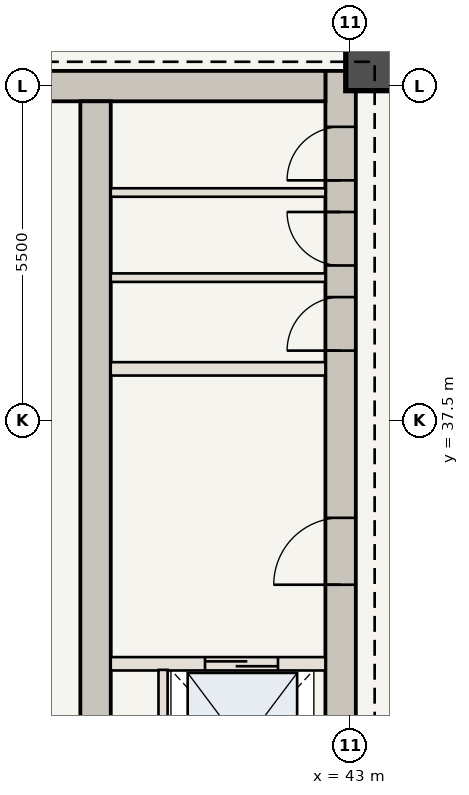
"""IFC4 building model, lengths in metres.
Left out: names, types, materials, properties, quantities, classifications, styles, units other than length and angle.
Written with IfcOpenShell. Run it as: python <this file> out.ifc"""

import sys

from ifc_helpers import new_model, si_unit, direction, frame, frame_2d, origin, origin_2d, place, context, subcontext, project, spatial, rectangle, extrude, element, fill, save


model = new_model("IFC4")
c1 = context("Model", 3, precision=1e-05, world=origin(), true_north=direction((0.0, 1.0)))
c2 = subcontext(c1, "Body", "Model", "MODEL_VIEW")
j1 = project(units=[si_unit("LENGTHUNIT", "METRE"), si_unit("PLANEANGLEUNIT", "RADIAN")], contexts=[c1])
p1 = place(None, origin())
s1 = spatial("IfcSite", under=j1, at=p1, CompositionType="ELEMENT")
p2 = place(p1, origin())
s2 = spatial("IfcBuilding", under=s1, at=p2, CompositionType="ELEMENT")
p3 = place(p2, frame((0.0, 0.0, 229.25)))
s3 = spatial("IfcBuildingStorey", under=s2, at=p3, CompositionType="ELEMENT", Elevation=229.25)
p4 = place(p3, frame((42.84, 30.6, 0.0), z_axis=(0.0, 0.0, 1.0), x_axis=(0.0, 1.0, 0.0)))
e1 = element("IfcWall", 1, at=p4, inside=s3, PredefinedType="SHEAR", context=c2, shape_type="SweptSolid", body=[
    extrude(rectangle(XDim=12.65, YDim=0.5, at=frame_2d((6.325, 0.0))), origin(), (0.0, 0.0, 1.0), 3.85),
])
p5 = place(p4, frame((4.2, 0.0, 0.0)))
e2 = element("IfcOpeningElement", 2, at=p5, cuts=e1, PredefinedType="OPENING", context=c2, shape_type="SweptSolid", body=[
    extrude(rectangle(XDim=1.1, YDim=2.15, at=frame_2d((0.55, 1.075))), frame((0.0, 0.26, 0.0), z_axis=(0.0, -1.0, 0.0), x_axis=(1.0, 0.0, 0.0)), (0.0, 0.0, 1.0), 0.52),
])
p6 = place(p4, frame((8.05, 0.0, 0.0)))
e3 = element("IfcOpeningElement", 3, at=p6, cuts=e1, PredefinedType="OPENING", context=c2, shape_type="SweptSolid", body=[
    extrude(rectangle(XDim=0.88, YDim=2.1, at=frame_2d((0.44, 1.05))), frame((0.0, 0.26, 0.0), z_axis=(0.0, -1.0, 0.0), x_axis=(1.0, 0.0, 0.0)), (0.0, 0.0, 1.0), 0.52),
])
p7 = place(p4, frame((9.45, 0.0, 0.0)))
e4 = element("IfcOpeningElement", 4, at=p7, cuts=e1, PredefinedType="OPENING", context=c2, shape_type="SweptSolid", body=[
    extrude(rectangle(XDim=0.88, YDim=2.1, at=frame_2d((0.44, 1.05))), frame((0.0, 0.26, 0.0), z_axis=(0.0, -1.0, 0.0), x_axis=(1.0, 0.0, 0.0)), (0.0, 0.0, 1.0), 0.52),
])
p8 = place(p4, frame((10.85, 0.0, 0.0)))
e5 = element("IfcOpeningElement", 5, at=p8, cuts=e1, PredefinedType="OPENING", context=c2, shape_type="SweptSolid", body=[
    extrude(rectangle(XDim=0.88, YDim=2.1, at=frame_2d((0.44, 1.05))), frame((0.0, 0.26, 0.0), z_axis=(0.0, -1.0, 0.0), x_axis=(1.0, 0.0, 0.0)), (0.0, 0.0, 1.0), 0.52),
])
p9 = place(p3, frame((37.75, 43.0, 0.0), z_axis=(0.0, 0.0, 1.0), x_axis=(1.0, 0.0, 0.0)))
e6 = element("IfcWall", 6, at=p9, inside=s3, PredefinedType="SHEAR", context=c2, shape_type="SweptSolid", body=[
    extrude(rectangle(XDim=4.84, YDim=0.5, at=frame_2d((2.42, 0.0))), origin(), (0.0, 0.0, 1.0), 3.85),
])
p10 = place(p3, frame((38.81, 30.6, 0.0), z_axis=(0.0, 0.0, 1.0), x_axis=(0.0, 1.0, 0.0)))
e7 = element("IfcWall", 7, at=p10, inside=s3, PredefinedType="SHEAR", context=c2, shape_type="SweptSolid", body=[
    extrude(rectangle(XDim=12.15, YDim=0.5, at=frame_2d((6.075, 0.0))), origin(), (0.0, 0.0, 1.0), 3.85),
])
p11 = place(p3, frame((43.35, 43.35, 0.0), z_axis=(0.0, 0.0, 1.0), x_axis=(1.0, 0.0, 0.0)))
e8 = element("IfcColumn", 8, at=p11, inside=s3, PredefinedType="COLUMN", context=c2, shape_type="SweptSolid", body=[
    extrude(rectangle(XDim=0.85, YDim=0.85, at=origin_2d()), origin(), (0.0, 0.0, 1.0), 3.85),
])
p12 = place(p3, frame((39.06, 33.5, 0.0), z_axis=(0.0, 0.0, 1.0), x_axis=(1.0, 0.0, 0.0)))
e9 = element("IfcWall", 9, at=p12, inside=s3, PredefinedType="STANDARD", context=c2, shape_type="SweptSolid", body=[
    extrude(rectangle(XDim=3.53, YDim=0.22, at=frame_2d((1.765, 0.0))), origin(), (0.0, 0.0, 1.0), 3.685),
])
p13 = place(p12, frame((1.55, 0.0, 0.0)))
e10 = element("IfcOpeningElement", 10, at=p13, cuts=e9, PredefinedType="OPENING", context=c2, shape_type="SweptSolid", body=[
    extrude(rectangle(XDim=1.2, YDim=2.2, at=frame_2d((0.6, 1.1))), frame((0.0, 0.12, 0.0), z_axis=(0.0, -1.0, 0.0), x_axis=(1.0, 0.0, 0.0)), (0.0, 0.0, 1.0), 0.24),
])
p14 = place(p3, frame((39.92, 30.75, 0.0), z_axis=(0.0, 0.0, 1.0), x_axis=(0.0, 1.0, 0.0)))
e11 = element("IfcWall", 11, at=p14, inside=s3, PredefinedType="STANDARD", context=c2, shape_type="SweptSolid", body=[
    extrude(rectangle(XDim=2.65, YDim=0.15, at=frame_2d((1.325, 0.0))), origin(), (0.0, 0.0, 1.0), 3.685),
])
p15 = place(p3, frame((39.06, 38.35, 0.0), z_axis=(0.0, 0.0, 1.0), x_axis=(1.0, 0.0, 0.0)))
e12 = element("IfcWall", 12, at=p15, inside=s3, PredefinedType="STANDARD", context=c2, shape_type="SweptSolid", body=[
    extrude(rectangle(XDim=3.53, YDim=0.22, at=frame_2d((1.765, 0.0))), origin(), (0.0, 0.0, 1.0), 3.685),
])
for number, where, z_axis, x_axis in (
    (13, (39.06, 39.85, 0.0), (0.0, 0.0, 1.0), (1.0, 0.0, 0.0)),
    (14, (39.06, 41.25, 0.0), (0.0, 0.0, 1.0), (1.0, 0.0, 0.0)),
):
    element("IfcWall", number, at=place(p3, frame(where, z_axis=z_axis, x_axis=x_axis)), inside=s3, PredefinedType="STANDARD", context=c2, shape_type="SweptSolid", body=[
        extrude(rectangle(XDim=3.53, YDim=0.14, at=frame_2d((1.765, 0.0))), origin(), (0.0, 0.0, 1.0), 3.685),
    ])
p16 = place(p5, origin())
e15 = element("IfcDoor", 15, at=p16, inside=s3, OperationType="SINGLE_SWING_LEFT", PredefinedType="DOOR", context=c2, shape_type="SweptSolid", body=[
    extrude(rectangle(XDim=1.1, YDim=2.15, at=frame_2d((0.55, 1.075))), frame((0.0, 0.025, 0.0), z_axis=(0.0, -1.0, 0.0), x_axis=(1.0, 0.0, 0.0)), (0.0, 0.0, 1.0), 0.05),
])
fill(e2, e15)
p17 = place(p6, origin())
e16 = element("IfcDoor", 16, at=p17, inside=s3, OperationType="SINGLE_SWING_LEFT", PredefinedType="DOOR", context=c2, shape_type="SweptSolid", body=[
    extrude(rectangle(XDim=0.88, YDim=2.1, at=frame_2d((0.44, 1.05))), frame((0.0, 0.025, 0.0), z_axis=(0.0, -1.0, 0.0), x_axis=(1.0, 0.0, 0.0)), (0.0, 0.0, 1.0), 0.05),
])
fill(e3, e16)
p18 = place(p7, origin())
e17 = element("IfcDoor", 17, at=p18, inside=s3, OperationType="SINGLE_SWING_RIGHT", PredefinedType="DOOR", context=c2, shape_type="SweptSolid", body=[
    extrude(rectangle(XDim=0.88, YDim=2.1, at=frame_2d((0.44, 1.05))), frame((0.0, 0.025, 0.0), z_axis=(0.0, -1.0, 0.0), x_axis=(1.0, 0.0, 0.0)), (0.0, 0.0, 1.0), 0.05),
])
fill(e4, e17)
p19 = place(p8, origin())
e18 = element("IfcDoor", 18, at=p19, inside=s3, OperationType="SINGLE_SWING_LEFT", PredefinedType="DOOR", context=c2, shape_type="SweptSolid", body=[
    extrude(rectangle(XDim=0.88, YDim=2.1, at=frame_2d((0.44, 1.05))), frame((0.0, 0.025, 0.0), z_axis=(0.0, -1.0, 0.0), x_axis=(1.0, 0.0, 0.0)), (0.0, 0.0, 1.0), 0.05),
])
fill(e5, e18)
p20 = place(p13, origin())
e19 = element("IfcDoor", 19, at=p20, inside=s3, OperationType="DOUBLE_DOOR_SLIDING", PredefinedType="DOOR", context=c2, shape_type="SweptSolid", body=[
    extrude(rectangle(XDim=1.2, YDim=2.2, at=frame_2d((0.6, 1.1))), frame((0.0, 0.025, 0.0), z_axis=(0.0, -1.0, 0.0), x_axis=(1.0, 0.0, 0.0)), (0.0, 0.0, 1.0), 0.05),
])
fill(e10, e19)
save(model, sys.argv[1])
